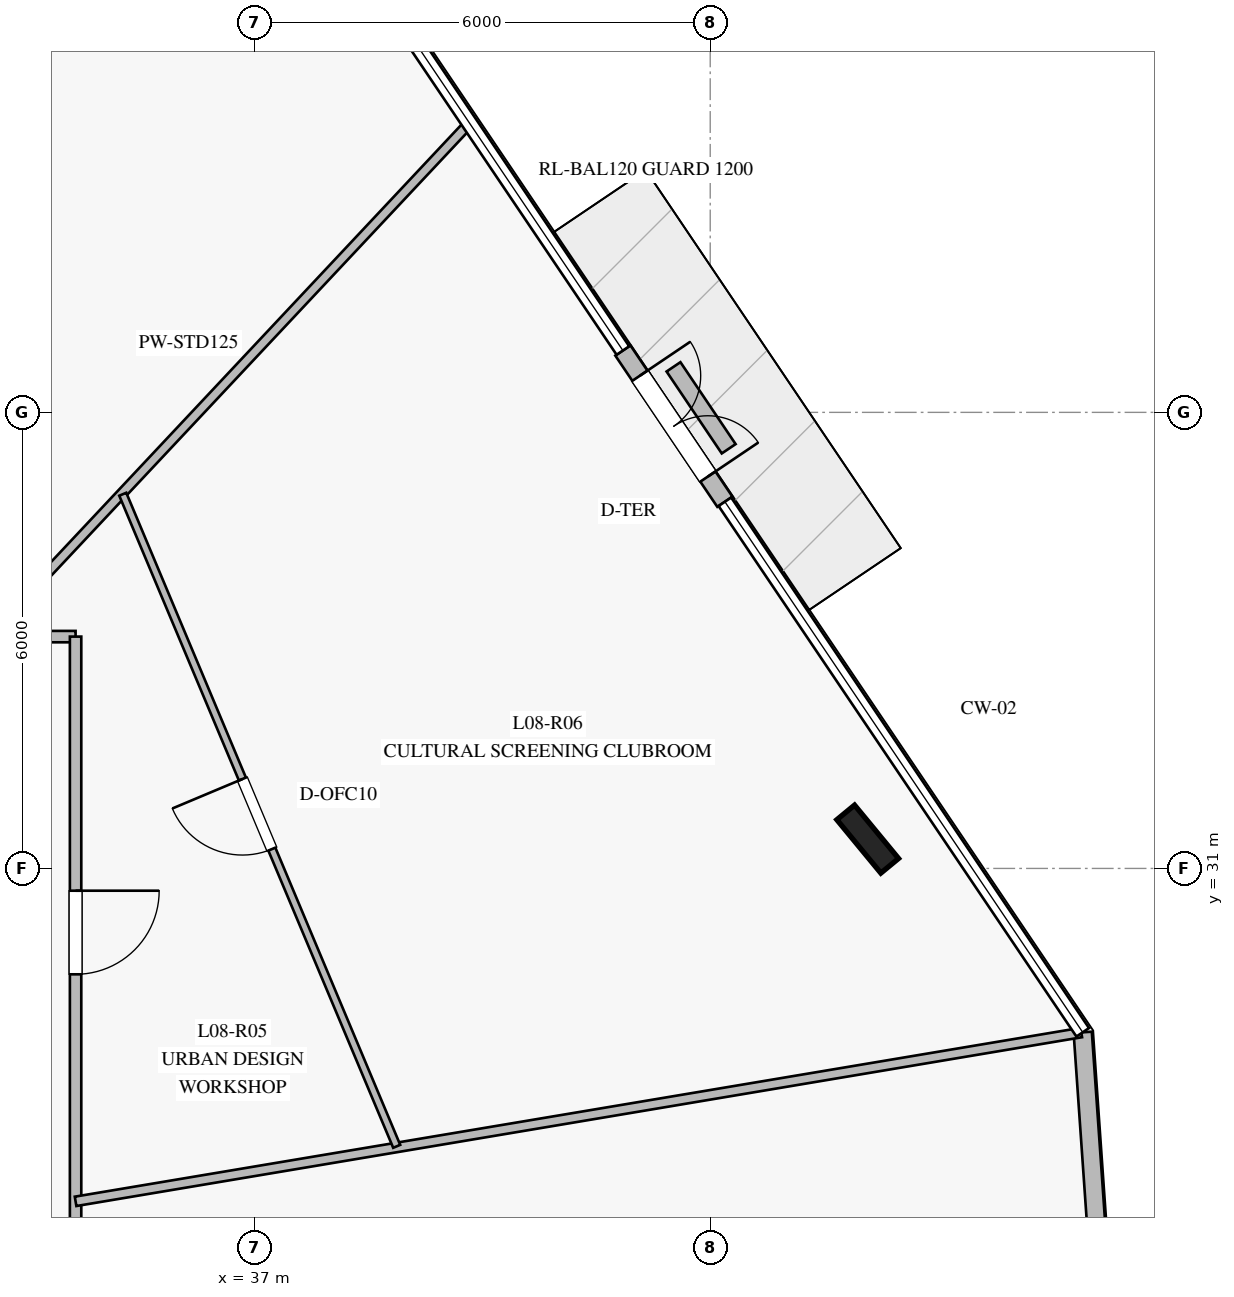
"""IFC4 building model, lengths in metres.
Left out: names, types, materials, properties, quantities, classifications, styles, units other than length and angle.
Written with IfcOpenShell. Run it as: python <this file> out.ifc"""

import sys

from ifc_helpers import new_model, si_unit, direction, frame, frame_2d, origin, origin_2d, place, context, subcontext, project, spatial, rectangle, i_section, extrude, element, fill, save


model = new_model("IFC4")
c1 = context("Model", 3, precision=1e-05, world=origin(), true_north=direction((0.0, 1.0)))
c2 = subcontext(c1, "Body", "Model", "MODEL_VIEW")
j1 = project(units=[si_unit("LENGTHUNIT", "METRE"), si_unit("PLANEANGLEUNIT", "RADIAN")], contexts=[c1])
p1 = place(None, origin())
s1 = spatial("IfcSite", under=j1, at=p1, CompositionType="ELEMENT")
p2 = place(p1, origin())
s2 = spatial("IfcBuilding", under=s1, at=p2, CompositionType="ELEMENT")
p3 = place(p2, frame((0.0, 0.0, 36.0)))
s3 = spatial("IfcBuildingStorey", under=s2, at=p3, CompositionType="ELEMENT", Elevation=36.0)
p4 = place(p3, frame((45.072, 31.386, 0.0), z_axis=(0.0, 0.0, 1.0), x_axis=(-0.636078220278, 0.771624583388, 0.0)))
e1 = element("IfcColumn", 1, at=p4, inside=s3, PredefinedType="COLUMN", context=c2, shape_type="SweptSolid", body=[
    extrude(i_section(OverallWidth=0.302, OverallDepth=0.91, WebThickness=0.021, FlangeThickness=0.04, at=origin_2d()), origin(), (0.0, 0.0, 1.0), 4.0),
])
p5 = place(p3, frame((43.193, 35.824, 0.0), z_axis=(0.0, 0.0, 1.0), x_axis=(-0.559128660759, 0.82908090119, 0.0)))
e2 = element("IfcWall", 2, at=p5, inside=s3, PredefinedType="STANDARD", context=c2, shape_type="SweptSolid", body=[
    extrude(rectangle(XDim=2.4, YDim=0.24, at=frame_2d((1.2, 0.0))), origin(), (0.0, 0.0, 1.0), 3.76),
])
p6 = place(p5, frame((0.4, 0.0, 0.0)))
e3 = element("IfcOpeningElement", 3, at=p6, cuts=e2, PredefinedType="OPENING", context=c2, shape_type="SweptSolid", body=[
    extrude(rectangle(XDim=1.6, YDim=2.25, at=frame_2d((0.8, 1.125))), frame((0.0, 0.13, 0.0), z_axis=(0.0, -1.0, 0.0), x_axis=(1.0, 0.0, 0.0)), (0.0, 0.0, 1.0), 0.26),
])
p7 = place(p3, frame((48.213, 24.382, 0.0), z_axis=(0.0, 0.0, 1.0), x_axis=(-0.069757428916, 0.997563983467, 0.0)))
e4 = element("IfcWall", 4, at=p7, inside=s3, PredefinedType="STANDARD", context=c2, shape_type="SweptSolid", body=[
    extrude(rectangle(XDim=4.473, YDim=0.24, at=frame_2d((2.236, 0.0))), origin(), (0.0, 0.0, 1.0), 3.76),
])
p8 = place(p3, frame((43.243, 36.521, 0.0), z_axis=(0.0, 0.0, 1.0), x_axis=(-0.558465865857, 0.829527502059, 0.0)))
e5 = element("IfcWall", 5, at=p8, inside=s3, PredefinedType="USERDEFINED", context=c2, shape_type="SweptSolid", body=[
    extrude(rectangle(XDim=1.3, YDim=0.22, at=frame_2d((0.65, 0.0))), origin(), (0.0, 0.0, 1.0), 0.4),
])
p9 = place(p3, frame((15.35, 34.05, 0.0), z_axis=(0.0, 0.0, 1.0), x_axis=(1.0, 0.0, 0.0)))
e6 = element("IfcWall", 6, at=p9, inside=s3, PredefinedType="PARTITIONING", context=c2, shape_type="SweptSolid", body=[
    extrude(rectangle(XDim=19.3, YDim=0.15, at=frame_2d((9.65, 0.0))), origin(), (0.0, 0.0, 1.0), 3.21),
])
p10 = place(p9, frame((12.369, 0.0, 0.0)))
e7 = element("IfcOpeningElement", 7, at=p10, cuts=e6, PredefinedType="OPENING", context=c2, shape_type="SweptSolid", body=[
    extrude(rectangle(XDim=1.1, YDim=2.2, at=frame_2d((0.55, 1.1))), frame((0.0, 0.085, 0.0), z_axis=(0.0, -1.0, 0.0), x_axis=(1.0, 0.0, 0.0)), (0.0, 0.0, 1.0), 0.17),
])
p11 = place(p9, frame((3.347, 0.0, 0.0)))
e8 = element("IfcOpeningElement", 8, at=p11, cuts=e6, PredefinedType="OPENING", context=c2, shape_type="SweptSolid", body=[
    extrude(rectangle(XDim=1.1, YDim=2.2, at=frame_2d((0.55, 1.1))), frame((0.0, 0.085, 0.0), z_axis=(0.0, -1.0, 0.0), x_axis=(1.0, 0.0, 0.0)), (0.0, 0.0, 1.0), 0.17),
])
p12 = place(p3, frame((34.65, 34.05, 0.0), z_axis=(0.0, 0.0, 1.0), x_axis=(0.0, -1.0, 0.0)))
e9 = element("IfcWall", 9, at=p12, inside=s3, PredefinedType="PARTITIONING", context=c2, shape_type="SweptSolid", body=[
    extrude(rectangle(XDim=18.1, YDim=0.15, at=frame_2d((9.05, 0.0))), origin(), (0.0, 0.0, 1.0), 3.21),
])
p13 = place(p12, frame((11.691, 0.0, 0.0)))
e10 = element("IfcOpeningElement", 10, at=p13, cuts=e9, PredefinedType="OPENING", context=c2, shape_type="SweptSolid", body=[
    extrude(rectangle(XDim=1.1, YDim=2.2, at=frame_2d((0.55, 1.1))), frame((0.0, 0.085, 0.0), z_axis=(0.0, -1.0, 0.0), x_axis=(1.0, 0.0, 0.0)), (0.0, 0.0, 1.0), 0.17),
])
p14 = place(p12, frame((3.343, 0.0, 0.0)))
e11 = element("IfcOpeningElement", 11, at=p14, cuts=e9, PredefinedType="OPENING", context=c2, shape_type="SweptSolid", body=[
    extrude(rectangle(XDim=1.1, YDim=2.2, at=frame_2d((0.55, 1.1))), frame((0.0, 0.085, 0.0), z_axis=(0.0, -1.0, 0.0), x_axis=(1.0, 0.0, 0.0)), (0.0, 0.0, 1.0), 0.17),
])
p15 = place(p3, frame((33.492, 34.05, 0.0), z_axis=(0.0, 0.0, 1.0), x_axis=(0.684323058839, 0.72917895687, 0.0)))
e12 = element("IfcWall", 12, at=p15, inside=s3, PredefinedType="PARTITIONING", context=c2, shape_type="SweptSolid", body=[
    extrude(rectangle(XDim=9.247, YDim=0.125, at=frame_2d((4.624, 0.0))), origin(), (0.0, 0.0, 1.0), 3.06),
])
p16 = place(p3, frame((34.65, 26.62, 0.0), z_axis=(0.0, 0.0, 1.0), x_axis=(0.986204923265, 0.165528998449, 0.0)))
e13 = element("IfcWall", 13, at=p16, inside=s3, PredefinedType="PARTITIONING", context=c2, shape_type="SweptSolid", body=[
    extrude(rectangle(XDim=13.417, YDim=0.125, at=frame_2d((6.708, 0.0))), origin(), (0.0, 0.0, 1.0), 3.06),
])
p17 = place(p3, frame((38.875, 27.344, 0.0), z_axis=(0.0, 0.0, 1.0), x_axis=(-0.387303850875, 0.92195212842, 0.0)))
e14 = element("IfcWall", 14, at=p17, inside=s3, PredefinedType="MOVABLE", context=c2, shape_type="SweptSolid", body=[
    extrude(rectangle(XDim=9.305, YDim=0.1, at=frame_2d((4.653, 0.0))), origin(), (0.0, 0.0, 1.0), 3.21),
])
p18 = place(p17, frame((4.241, 0.0, 0.0)))
e15 = element("IfcOpeningElement", 15, at=p18, cuts=e14, PredefinedType="OPENING", context=c2, shape_type="SweptSolid", body=[
    extrude(rectangle(XDim=1.0, YDim=2.15, at=frame_2d((0.5, 1.075))), frame((0.0, 0.06, 0.0), z_axis=(0.0, -1.0, 0.0), x_axis=(1.0, 0.0, 0.0)), (0.0, 0.0, 1.0), 0.12),
])
p19 = place(p6, frame((1.6, 0.0, 0.0), z_axis=(0.0, 0.0, 1.0), x_axis=(-1.0, 0.0, 0.0)))
e16 = element("IfcDoor", 16, at=p19, inside=s3, OperationType="DOUBLE_DOOR_SINGLE_SWING", PredefinedType="DOOR", context=c2, shape_type="SweptSolid", body=[
    extrude(rectangle(XDim=1.6, YDim=2.25, at=frame_2d((0.8, 1.125))), frame((0.0, 0.025, 0.0), z_axis=(0.0, -1.0, 0.0), x_axis=(1.0, 0.0, 0.0)), (0.0, 0.0, 1.0), 0.05),
])
fill(e3, e16)
p20 = place(p14, origin())
e17 = element("IfcDoor", 17, at=p20, inside=s3, OperationType="SINGLE_SWING_LEFT", PredefinedType="DOOR", context=c2, shape_type="SweptSolid", body=[
    extrude(rectangle(XDim=1.1, YDim=2.2, at=frame_2d((0.55, 1.1))), frame((0.0, 0.025, 0.0), z_axis=(0.0, -1.0, 0.0), x_axis=(1.0, 0.0, 0.0)), (0.0, 0.0, 1.0), 0.05),
])
fill(e11, e17)
p21 = place(p18, origin())
e18 = element("IfcDoor", 18, at=p21, inside=s3, OperationType="SINGLE_SWING_RIGHT", PredefinedType="DOOR", context=c2, shape_type="SweptSolid", body=[
    extrude(rectangle(XDim=1.0, YDim=2.15, at=frame_2d((0.5, 1.075))), frame((0.0, 0.025, 0.0), z_axis=(0.0, -1.0, 0.0), x_axis=(1.0, 0.0, 0.0)), (0.0, 0.0, 1.0), 0.05),
])
fill(e15, e18)
save(model, sys.argv[1])
